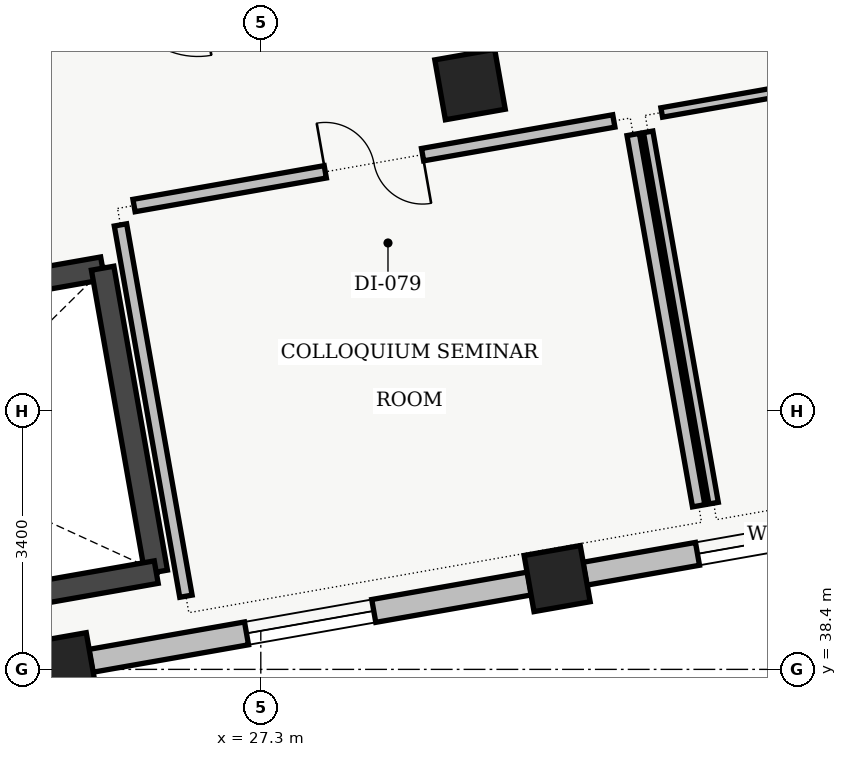
"""IFC4 building model, lengths in metres.
Left out: names, types, materials, properties, quantities, classifications, styles, units other than length and angle.
Written with IfcOpenShell. Run it as: python <this file> out.ifc"""

import sys

from ifc_helpers import new_model, si_unit, direction, frame, frame_2d, origin, origin_2d, place, context, subcontext, project, spatial, rectangle, extrude, element, fill, save


model = new_model("IFC4")
c1 = context("Model", 3, precision=1e-05, world=origin(), true_north=direction((0.0, 1.0)))
c2 = subcontext(c1, "Body", "Model", "MODEL_VIEW")
j1 = project(units=[si_unit("LENGTHUNIT", "METRE"), si_unit("PLANEANGLEUNIT", "RADIAN")], contexts=[c1])
p1 = place(None, origin())
s1 = spatial("IfcSite", under=j1, at=p1, CompositionType="ELEMENT")
p2 = place(p1, origin())
s2 = spatial("IfcBuilding", under=s1, at=p2, CompositionType="ELEMENT")
p3 = place(p2, frame((0.0, 0.0, 5.1)))
s3 = spatial("IfcBuildingStorey", under=s2, at=p3, CompositionType="ELEMENT", Elevation=5.1)
for number, where, z_axis, x_axis in (
    (1, (24.699, 38.448, 0.0), (0.0, 0.0, 1.0), (0.985, 0.174, 0.0)),
    (2, (31.199, 39.594, 0.0), (0.0, 0.0, 1.0), (0.985, 0.174, 0.0)),
):
    element("IfcColumn", number, at=place(p3, frame(where, z_axis=z_axis, x_axis=x_axis)), inside=s3, PredefinedType="COLUMN", context=c2, shape_type="SweptSolid", body=[
        extrude(rectangle(XDim=0.75, YDim=0.75, at=origin_2d()), origin(), (0.0, 0.0, 1.0), 4.31),
    ])
p4 = place(p3, frame((30.053, 46.094, 0.0), z_axis=(0.0, 0.0, 1.0), x_axis=(0.984807753012, 0.173648177667, 0.0)))
e3 = element("IfcColumn", 3, at=p4, inside=s3, PredefinedType="COLUMN", context=c2, shape_type="SweptSolid", body=[
    extrude(rectangle(XDim=0.8, YDim=0.8, at=origin_2d()), origin(), (0.0, 0.0, 1.0), 4.31),
])
p5 = place(p3, frame((37.334, 40.676, 0.0), z_axis=(0.0, 0.0, 1.0), x_axis=(-0.984807875342, -0.1736474839, 0.0)))
e4 = element("IfcWall", 4, at=p5, inside=s3, PredefinedType="STANDARD", context=c2, shape_type="SweptSolid", body=[
    extrude(rectangle(XDim=5.86, YDim=0.305, at=frame_2d((2.93, 0.0))), origin(), (0.0, 0.0, 1.0), 3.795),
])
p6 = place(p5, frame((1.505, 0.0, 0.95)))
e5 = element("IfcOpeningElement", 5, at=p6, cuts=e4, PredefinedType="OPENING", context=c2, shape_type="SweptSolid", body=[
    extrude(rectangle(XDim=2.85, YDim=1.5, at=frame_2d((1.425, 0.75))), frame((0.0, 0.152, 0.0), z_axis=(0.0, -1.0, 0.0), x_axis=(1.0, 0.0, 0.0)), (0.0, 0.0, 1.0), 0.305),
])
p7 = place(p3, frame((30.834, 39.53, 0.0), z_axis=(0.0, 0.0, 1.0), x_axis=(-0.984807875342, -0.1736474839, 0.0)))
e6 = element("IfcWall", 6, at=p7, inside=s3, PredefinedType="STANDARD", context=c2, shape_type="SweptSolid", body=[
    extrude(rectangle(XDim=5.86, YDim=0.305, at=frame_2d((2.93, 0.0))), origin(), (0.0, 0.0, 1.0), 3.795),
])
p8 = place(p7, frame((2.08, 0.0, 0.95)))
e7 = element("IfcOpeningElement", 7, at=p8, cuts=e6, PredefinedType="OPENING", context=c2, shape_type="SweptSolid", body=[
    extrude(rectangle(XDim=1.7, YDim=1.55, at=frame_2d((0.85, 0.775))), frame((0.0, 0.152, 0.0), z_axis=(0.0, -1.0, 0.0), x_axis=(1.0, 0.0, 0.0)), (0.0, 0.0, 1.0), 0.305),
])
p9 = place(p3, frame((17.863, 42.381, 0.0), z_axis=(0.0, 0.0, 1.0), x_axis=(0.984808225754, 0.173645496596, 0.0)))
e8 = element("IfcWall", 8, at=p9, inside=s3, PredefinedType="SHEAR", context=c2, shape_type="SweptSolid", body=[
    extrude(rectangle(XDim=7.47, YDim=0.3, at=frame_2d((3.735, 0.0))), origin(), (0.0, 0.0, 1.0), 4.28),
])
p10 = place(p9, frame((0.18, 0.0, 0.0)))
e9 = element("IfcOpeningElement", 9, at=p10, cuts=e8, PredefinedType="OPENING", context=c2, shape_type="SweptSolid", body=[
    extrude(rectangle(XDim=1.18, YDim=2.15, at=frame_2d((0.59, 1.075))), frame((0.0, 0.15, 0.0), z_axis=(0.0, -1.0, 0.0), x_axis=(1.0, 0.0, 0.0)), (0.0, 0.0, 1.0), 0.3),
])
p11 = place(p3, frame((25.219, 43.678, 0.0), z_axis=(0.0, 0.0, 1.0), x_axis=(0.173665267602, -0.984804739443, 0.0)))
e10 = element("IfcWall", 10, at=p11, inside=s3, PredefinedType="SHEAR", context=c2, shape_type="SweptSolid", body=[
    extrude(rectangle(XDim=4.06, YDim=0.3, at=frame_2d((2.03, 0.0))), origin(), (0.0, 0.0, 1.0), 4.28),
])
p12 = place(p3, frame((25.924, 39.68, 0.0), z_axis=(0.0, 0.0, 1.0), x_axis=(-0.984809211193, -0.173639907711, 0.0)))
e11 = element("IfcWall", 11, at=p12, inside=s3, PredefinedType="SHEAR", context=c2, shape_type="SweptSolid", body=[
    extrude(rectangle(XDim=7.47, YDim=0.3, at=frame_2d((3.735, 0.0))), origin(), (0.0, 0.0, 1.0), 4.28),
])
p13 = place(p3, frame((20.665, 46.469, 0.0), z_axis=(0.0, 0.0, 1.0), x_axis=(0.984804338045, 0.173667543796, 0.0)))
e12 = element("IfcWall", 12, at=p13, inside=s3, PredefinedType="PARTITIONING", context=c2, shape_type="SweptSolid", body=[
    extrude(rectangle(XDim=10.76, YDim=0.165, at=frame_2d((5.38, 0.0))), origin(), (0.0, 0.0, 1.0), 3.95),
])
p14 = place(p13, frame((4.865, 0.0, 0.0)))
e13 = element("IfcOpeningElement", 13, at=p14, cuts=e12, PredefinedType="OPENING", context=c2, shape_type="SweptSolid", body=[
    extrude(rectangle(XDim=1.03, YDim=2.16, at=frame_2d((0.515, 1.08))), frame((0.0, 0.083, 0.0), z_axis=(0.0, -1.0, 0.0), x_axis=(1.0, 0.0, 0.0)), (0.0, 0.0, 1.0), 0.165),
])
p15 = place(p3, frame((33.061, 40.552, 0.0), z_axis=(0.0, 0.0, 1.0), x_axis=(-0.173658971256, 0.98480584975, 0.0)))
e14 = element("IfcWall", 14, at=p15, inside=s3, PredefinedType="PARTITIONING", context=c2, shape_type="SweptSolid", body=[
    extrude(rectangle(XDim=4.96, YDim=0.165, at=frame_2d((2.48, 0.0))), origin(), (0.0, 0.0, 1.0), 3.95),
])
p16 = place(p3, frame((31.945, 45.615, 0.0), z_axis=(0.0, 0.0, 1.0), x_axis=(-0.984809620557, -0.173637585958, 0.0)))
e15 = element("IfcWall", 15, at=p16, inside=s3, PredefinedType="PARTITIONING", context=c2, shape_type="SweptSolid", body=[
    extrude(rectangle(XDim=6.41, YDim=0.165, at=frame_2d((3.205, 0.0))), origin(), (0.0, 0.0, 1.0), 3.95),
])
p17 = place(p16, frame((2.555, 0.0, 0.0)))
e16 = element("IfcOpeningElement", 16, at=p17, cuts=e15, PredefinedType="OPENING", context=c2, shape_type="SweptSolid", body=[
    extrude(rectangle(XDim=1.3, YDim=2.18, at=frame_2d((0.65, 1.09))), frame((0.0, 0.083, 0.0), z_axis=(0.0, -1.0, 0.0), x_axis=(1.0, 0.0, 0.0)), (0.0, 0.0, 1.0), 0.165),
])
p18 = place(p3, frame((25.454, 44.247, 0.0), z_axis=(0.0, 0.0, 1.0), x_axis=(0.173658971256, -0.98480584975, 0.0)))
e17 = element("IfcWall", 17, at=p18, inside=s3, PredefinedType="PARTITIONING", context=c2, shape_type="SweptSolid", body=[
    extrude(rectangle(XDim=4.96, YDim=0.165, at=frame_2d((2.48, 0.0))), origin(), (0.0, 0.0, 1.0), 3.95),
])
p19 = place(p3, frame((42.581, 47.491, 0.0), z_axis=(0.0, 0.0, 1.0), x_axis=(-0.98480532288, -0.173661959067, 0.0)))
e18 = element("IfcWall", 18, at=p19, inside=s3, PredefinedType="PARTITIONING", context=c2, shape_type="SweptSolid", body=[
    extrude(rectangle(XDim=10.16, YDim=0.125, at=frame_2d((5.08, 0.0))), origin(), (0.0, 0.0, 1.0), 3.95),
])
p20 = place(p19, frame((3.688, 0.0, 0.0)))
e19 = element("IfcOpeningElement", 19, at=p20, cuts=e18, PredefinedType="OPENING", context=c2, shape_type="SweptSolid", body=[
    extrude(rectangle(XDim=0.94, YDim=2.12, at=frame_2d((0.47, 1.06))), frame((0.0, 0.062, 0.0), z_axis=(0.0, -1.0, 0.0), x_axis=(1.0, 0.0, 0.0)), (0.0, 0.0, 1.0), 0.125),
])
p21 = place(p3, frame((32.396, 45.472, 0.0), z_axis=(0.0, 0.0, 1.0), x_axis=(0.173650553511, -0.984807334084, 0.0)))
e20 = element("IfcWall", 20, at=p21, inside=s3, PredefinedType="PARTITIONING", context=c2, shape_type="SweptSolid", body=[
    extrude(rectangle(XDim=4.96, YDim=0.125, at=frame_2d((2.48, 0.0))), origin(), (0.0, 0.0, 1.0), 3.95),
])
p22 = place(p6, origin())
e21 = element("IfcWindow", 21, at=p22, inside=s3, PartitioningType="SINGLE_PANEL", PredefinedType="WINDOW", context=c2, shape_type="SweptSolid", body=[
    extrude(rectangle(XDim=2.85, YDim=1.5, at=frame_2d((1.425, 0.75))), frame((0.0, 0.03, 0.0), z_axis=(0.0, -1.0, 0.0), x_axis=(1.0, 0.0, 0.0)), (0.0, 0.0, 1.0), 0.06),
])
fill(e5, e21)
p23 = place(p8, origin())
e22 = element("IfcWindow", 22, at=p23, inside=s3, PartitioningType="SINGLE_PANEL", PredefinedType="WINDOW", context=c2, shape_type="SweptSolid", body=[
    extrude(rectangle(XDim=1.7, YDim=1.55, at=frame_2d((0.85, 0.775))), frame((0.0, 0.03, 0.0), z_axis=(0.0, -1.0, 0.0), x_axis=(1.0, 0.0, 0.0)), (0.0, 0.0, 1.0), 0.06),
])
fill(e7, e22)
p24 = place(p17, origin())
e23 = element("IfcDoor", 23, at=p24, inside=s3, OperationType="DOUBLE_DOOR_SINGLE_SWING", PredefinedType="DOOR", context=c2, shape_type="SweptSolid", body=[
    extrude(rectangle(XDim=1.3, YDim=2.18, at=frame_2d((0.65, 1.09))), frame((0.0, 0.025, 0.0), z_axis=(0.0, -1.0, 0.0), x_axis=(1.0, 0.0, 0.0)), (0.0, 0.0, 1.0), 0.05),
])
fill(e16, e23)
save(model, sys.argv[1])
